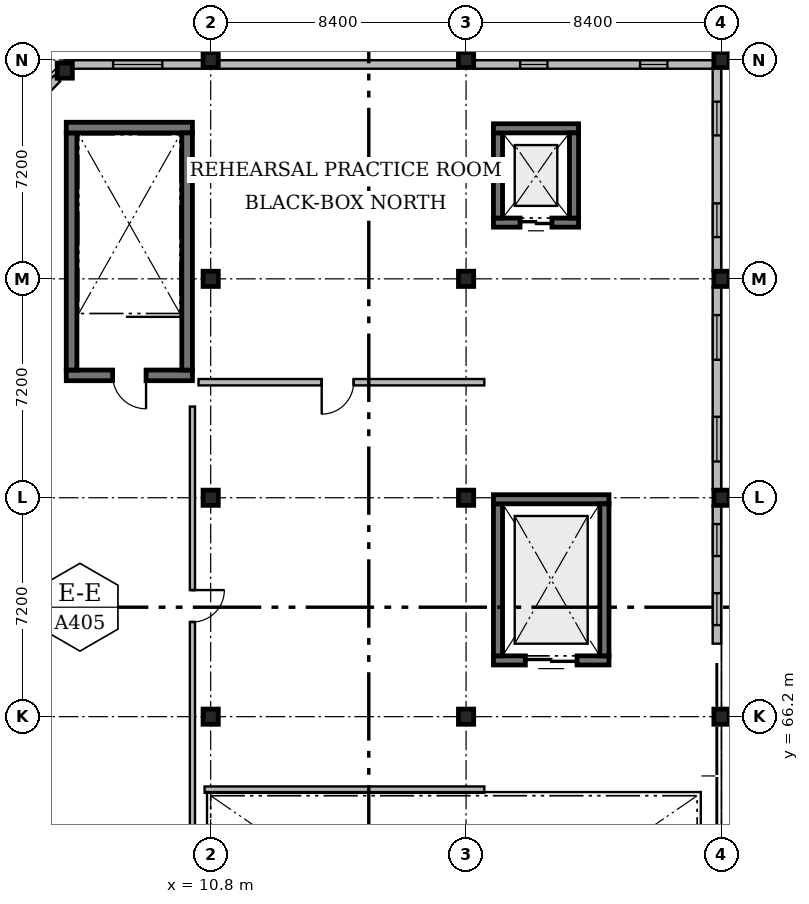
"""IFC4 building model, lengths in metres.
Left out: names, types, materials, properties, quantities, classifications, styles, units other than length and angle.
Written with IfcOpenShell. Run it as: python <this file> out.ifc"""

import sys

from ifc_helpers import new_model, si_unit, direction, frame, frame_2d, origin, origin_2d, place, context, subcontext, project, spatial, rectangle, extrude, element, fill, save


model = new_model("IFC4")
c1 = context("Model", 3, precision=1e-05, world=origin(), true_north=direction((0.0, 1.0)))
c2 = subcontext(c1, "Body", "Model", "MODEL_VIEW")
j1 = project(units=[si_unit("LENGTHUNIT", "METRE"), si_unit("PLANEANGLEUNIT", "RADIAN")], contexts=[c1])
p1 = place(None, origin())
s1 = spatial("IfcSite", under=j1, at=p1, CompositionType="ELEMENT")
p2 = place(p1, origin())
s2 = spatial("IfcBuilding", under=s1, at=p2, CompositionType="ELEMENT")
p3 = place(p2, frame((0.0, 0.0, 13.2)))
s3 = spatial("IfcBuildingStorey", under=s2, at=p3, CompositionType="ELEMENT", Elevation=13.2)
for number, where, z_axis, x_axis in (
    (1, (10.8, 66.2, 0.0), (0.0, 0.0, 1.0), (1.0, 0.0, 0.0)),
    (2, (10.8, 73.4, 0.0), (0.0, 0.0, 1.0), (1.0, 0.0, 0.0)),
    (3, (10.8, 80.6, 0.0), (0.0, 0.0, 1.0), (1.0, 0.0, 0.0)),
    (4, (10.8, 87.8, 0.0), (0.0, 0.0, 1.0), (1.0, 0.0, 0.0)),
    (5, (19.2, 66.2, 0.0), (0.0, 0.0, 1.0), (1.0, 0.0, 0.0)),
    (6, (19.2, 73.4, 0.0), (0.0, 0.0, 1.0), (1.0, 0.0, 0.0)),
    (7, (19.2, 80.6, 0.0), (0.0, 0.0, 1.0), (1.0, 0.0, 0.0)),
    (8, (19.2, 87.8, 0.0), (0.0, 0.0, 1.0), (1.0, 0.0, 0.0)),
    (9, (27.6, 66.2, 0.0), (0.0, 0.0, 1.0), (1.0, 0.0, 0.0)),
    (10, (27.6, 73.4, 0.0), (0.0, 0.0, 1.0), (1.0, 0.0, 0.0)),
    (11, (27.6, 80.6, 0.0), (0.0, 0.0, 1.0), (1.0, 0.0, 0.0)),
    (12, (27.6, 87.8, 0.0), (0.0, 0.0, 1.0), (1.0, 0.0, 0.0)),
):
    element("IfcColumn", number, at=place(p3, frame(where, z_axis=z_axis, x_axis=x_axis)), inside=s3, PredefinedType="COLUMN", context=c2, shape_type="SweptSolid", body=[
        extrude(rectangle(XDim=0.5, YDim=0.5, at=origin_2d()), origin(), (0.0, 0.0, 1.0), 3.71),
    ])
p4 = place(p3, frame((6.0, 87.45, 0.0), z_axis=(0.0, 0.0, 1.0), x_axis=(1.0, 0.0, 0.0)))
e13 = element("IfcColumn", 13, at=p4, inside=s3, PredefinedType="COLUMN", context=c2, shape_type="SweptSolid", body=[
    extrude(rectangle(XDim=0.5, YDim=0.5, at=origin_2d()), origin(), (0.0, 0.0, 1.0), 3.82),
])
p5 = place(p3, frame((10.2, 77.425, 0.0), z_axis=(0.0, 0.0, 1.0), x_axis=(-1.0, 0.0, 0.0)))
e14 = element("IfcWall", 14, at=p5, inside=s3, PredefinedType="SOLIDWALL", context=c2, shape_type="SweptSolid", body=[
    extrude(rectangle(XDim=4.15, YDim=0.35, at=frame_2d((2.075, 0.0))), origin(), (0.0, 0.0, 1.0), 3.6),
])
p6 = place(p5, frame((1.525, 0.0, 0.0)))
e15 = element("IfcOpeningElement", 15, at=p6, cuts=e14, PredefinedType="OPENING", context=c2, shape_type="SweptSolid", body=[
    extrude(rectangle(XDim=1.1, YDim=2.15, at=frame_2d((0.55, 1.075))), frame((0.0, 0.195, 0.0), z_axis=(0.0, -1.0, 0.0), x_axis=(1.0, 0.0, 0.0)), (0.0, 0.0, 1.0), 0.39),
])
p7 = place(p3, frame((6.225, 77.6, 0.0), z_axis=(0.0, 0.0, 1.0), x_axis=(0.0, 1.0, 0.0)))
e16 = element("IfcWall", 16, at=p7, inside=s3, PredefinedType="SOLIDWALL", context=c2, shape_type="SweptSolid", body=[
    extrude(rectangle(XDim=7.8, YDim=0.35, at=frame_2d((3.9, 0.0))), origin(), (0.0, 0.0, 1.0), 3.6),
])
p8 = place(p3, frame((6.05, 85.575, 0.0), z_axis=(0.0, 0.0, 1.0), x_axis=(1.0, 0.0, 0.0)))
e17 = element("IfcWall", 17, at=p8, inside=s3, PredefinedType="SOLIDWALL", context=c2, shape_type="SweptSolid", body=[
    extrude(rectangle(XDim=4.15, YDim=0.35, at=frame_2d((2.075, 0.0))), origin(), (0.0, 0.0, 1.0), 3.6),
])
p9 = place(p3, frame((10.025, 85.4, 0.0), z_axis=(0.0, 0.0, 1.0), x_axis=(0.0, -1.0, 0.0)))
e18 = element("IfcWall", 18, at=p9, inside=s3, PredefinedType="SOLIDWALL", context=c2, shape_type="SweptSolid", body=[
    extrude(rectangle(XDim=7.8, YDim=0.35, at=frame_2d((3.9, 0.0))), origin(), (0.0, 0.0, 1.0), 3.6),
])
p10 = place(p3, frame((22.9, 82.45, 0.0), z_axis=(0.0, 0.0, 1.0), x_axis=(-1.0, 0.0, 0.0)))
e19 = element("IfcWall", 19, at=p10, inside=s3, PredefinedType="SOLIDWALL", context=c2, shape_type="SweptSolid", body=[
    extrude(rectangle(XDim=2.8, YDim=0.3, at=frame_2d((1.4, 0.0))), origin(), (0.0, 0.0, 1.0), 3.6),
])
p11 = place(p10, frame((0.875, 0.0, 0.0)))
e20 = element("IfcOpeningElement", 20, at=p11, cuts=e19, PredefinedType="OPENING", context=c2, shape_type="SweptSolid", body=[
    extrude(rectangle(XDim=1.05, YDim=2.15, at=frame_2d((0.525, 1.075))), frame((0.0, 0.17, 0.0), z_axis=(0.0, -1.0, 0.0), x_axis=(1.0, 0.0, 0.0)), (0.0, 0.0, 1.0), 0.34),
])
for number, where, z_axis, x_axis in (
    (21, (20.25, 82.6, 0.0), (0.0, 0.0, 1.0), (0.0, 1.0, 0.0)),
    (22, (20.1, 85.55, 0.0), (0.0, 0.0, 1.0), (1.0, 0.0, 0.0)),
    (23, (22.75, 85.4, 0.0), (0.0, 0.0, 1.0), (0.0, -1.0, 0.0)),
):
    element("IfcWall", number, at=place(p3, frame(where, z_axis=z_axis, x_axis=x_axis)), inside=s3, PredefinedType="SOLIDWALL", context=c2, shape_type="SweptSolid", body=[
        extrude(rectangle(XDim=2.8, YDim=0.3, at=frame_2d((1.4, 0.0))), origin(), (0.0, 0.0, 1.0), 3.6),
    ])
p12 = place(p3, frame((23.9, 68.05, 0.0), z_axis=(0.0, 0.0, 1.0), x_axis=(-1.0, 0.0, 0.0)))
e24 = element("IfcWall", 24, at=p12, inside=s3, PredefinedType="SOLIDWALL", context=c2, shape_type="SweptSolid", body=[
    extrude(rectangle(XDim=3.8, YDim=0.3, at=frame_2d((1.9, 0.0))), origin(), (0.0, 0.0, 1.0), 3.6),
])
p13 = place(p12, frame((1.05, 0.0, 0.0)))
e25 = element("IfcOpeningElement", 25, at=p13, cuts=e24, PredefinedType="OPENING", context=c2, shape_type="SweptSolid", body=[
    extrude(rectangle(XDim=1.7, YDim=2.4, at=frame_2d((0.85, 1.2))), frame((0.0, 0.17, 0.0), z_axis=(0.0, -1.0, 0.0), x_axis=(1.0, 0.0, 0.0)), (0.0, 0.0, 1.0), 0.34),
])
p14 = place(p3, frame((20.25, 68.2, 0.0), z_axis=(0.0, 0.0, 1.0), x_axis=(0.0, 1.0, 0.0)))
e26 = element("IfcWall", 26, at=p14, inside=s3, PredefinedType="SOLIDWALL", context=c2, shape_type="SweptSolid", body=[
    extrude(rectangle(XDim=5.0, YDim=0.3, at=frame_2d((2.5, 0.0))), origin(), (0.0, 0.0, 1.0), 3.6),
])
p15 = place(p3, frame((20.1, 73.35, 0.0), z_axis=(0.0, 0.0, 1.0), x_axis=(1.0, 0.0, 0.0)))
e27 = element("IfcWall", 27, at=p15, inside=s3, PredefinedType="SOLIDWALL", context=c2, shape_type="SweptSolid", body=[
    extrude(rectangle(XDim=3.8, YDim=0.3, at=frame_2d((1.9, 0.0))), origin(), (0.0, 0.0, 1.0), 3.6),
])
p16 = place(p3, frame((23.75, 73.2, 0.0), z_axis=(0.0, 0.0, 1.0), x_axis=(0.0, -1.0, 0.0)))
e28 = element("IfcWall", 28, at=p16, inside=s3, PredefinedType="SOLIDWALL", context=c2, shape_type="SweptSolid", body=[
    extrude(rectangle(XDim=5.0, YDim=0.3, at=frame_2d((2.5, 0.0))), origin(), (0.0, 0.0, 1.0), 3.6),
])
p17 = place(p3, frame((5.75, 87.193, 0.0), z_axis=(0.0, 0.0, 1.0), x_axis=(-0.696365862768, -0.71768696879, 0.0)))
e29 = element("IfcWall", 29, at=p17, inside=s3, PredefinedType="SOLIDWALL", context=c2, shape_type="SweptSolid", body=[
    extrude(rectangle(XDim=3.95, YDim=0.28, at=frame_2d((1.975, 0.0))), origin(), (0.0, 0.0, 1.0), 3.75),
])
p18 = place(p17, frame((1.2, 0.0, 0.95)))
e30 = element("IfcOpeningElement", 30, at=p18, cuts=e29, PredefinedType="OPENING", context=c2, shape_type="SweptSolid", body=[
    extrude(rectangle(XDim=1.55, YDim=1.8, at=frame_2d((0.775, 0.9))), frame((0.0, 0.16, 0.0), z_axis=(0.0, -1.0, 0.0), x_axis=(1.0, 0.0, 0.0)), (0.0, 0.0, 1.0), 0.32),
])
p19 = place(p3, frame((6.255, 87.65, 0.0), z_axis=(0.0, 0.0, 1.0), x_axis=(1.0, 0.0, 0.0)))
e31 = element("IfcWall", 31, at=p19, inside=s3, PredefinedType="SOLIDWALL", context=c2, shape_type="SweptSolid", body=[
    extrude(rectangle(XDim=4.29, YDim=0.28, at=frame_2d((2.145, 0.0))), origin(), (0.0, 0.0, 1.0), 3.75),
])
p20 = place(p19, frame((1.335, 0.0, 0.95)))
e32 = element("IfcOpeningElement", 32, at=p20, cuts=e31, PredefinedType="OPENING", context=c2, shape_type="SweptSolid", body=[
    extrude(rectangle(XDim=1.62, YDim=1.75, at=frame_2d((0.81, 0.875))), frame((0.0, 0.16, 0.0), z_axis=(0.0, -1.0, 0.0), x_axis=(1.0, 0.0, 0.0)), (0.0, 0.0, 1.0), 0.32),
])
p21 = place(p3, frame((11.055, 87.65, 0.0), z_axis=(0.0, 0.0, 1.0), x_axis=(1.0, 0.0, 0.0)))
e33 = element("IfcWall", 33, at=p21, inside=s3, PredefinedType="SOLIDWALL", context=c2, shape_type="SweptSolid", body=[
    extrude(rectangle(XDim=7.89, YDim=0.28, at=frame_2d((3.945, 0.0))), origin(), (0.0, 0.0, 1.0), 2.993),
])
p22 = place(p3, frame((19.455, 87.65, 0.0), z_axis=(0.0, 0.0, 1.0), x_axis=(1.0, 0.0, 0.0)))
e34 = element("IfcWall", 34, at=p22, inside=s3, PredefinedType="SOLIDWALL", context=c2, shape_type="SweptSolid", body=[
    extrude(rectangle(XDim=7.89, YDim=0.28, at=frame_2d((3.945, 0.0))), origin(), (0.0, 0.0, 1.0), 2.993),
])
p23 = place(p22, frame((1.522, 0.0, 0.95)))
e35 = element("IfcOpeningElement", 35, at=p23, cuts=e34, PredefinedType="OPENING", context=c2, shape_type="SweptSolid", body=[
    extrude(rectangle(XDim=0.9, YDim=1.7, at=frame_2d((0.45, 0.85))), frame((0.0, 0.16, 0.0), z_axis=(0.0, -1.0, 0.0), x_axis=(1.0, 0.0, 0.0)), (0.0, 0.0, 1.0), 0.32),
])
p24 = place(p22, frame((5.468, 0.0, 0.95)))
e36 = element("IfcOpeningElement", 36, at=p24, cuts=e34, PredefinedType="OPENING", context=c2, shape_type="SweptSolid", body=[
    extrude(rectangle(XDim=0.9, YDim=1.7, at=frame_2d((0.45, 0.85))), frame((0.0, 0.16, 0.0), z_axis=(0.0, -1.0, 0.0), x_axis=(1.0, 0.0, 0.0)), (0.0, 0.0, 1.0), 0.32),
])
p25 = place(p3, frame((27.45, 68.6, 0.0), z_axis=(0.0, 0.0, 1.0), x_axis=(0.0, 1.0, 0.0)))
e37 = element("IfcWall", 37, at=p25, inside=s3, PredefinedType="SOLIDWALL", context=c2, shape_type="SweptSolid", body=[
    extrude(rectangle(XDim=4.545, YDim=0.28, at=frame_2d((2.272, 0.0))), origin(), (0.0, 0.0, 1.0), 3.373),
])
p26 = place(p25, frame((0.611, 0.0, 0.95)))
e38 = element("IfcOpeningElement", 38, at=p26, cuts=e37, PredefinedType="OPENING", context=c2, shape_type="SweptSolid", body=[
    extrude(rectangle(XDim=1.05, YDim=1.85, at=frame_2d((0.525, 0.925))), frame((0.0, 0.16, 0.0), z_axis=(0.0, -1.0, 0.0), x_axis=(1.0, 0.0, 0.0)), (0.0, 0.0, 1.0), 0.32),
])
p27 = place(p25, frame((2.884, 0.0, 0.95)))
e39 = element("IfcOpeningElement", 39, at=p27, cuts=e37, PredefinedType="OPENING", context=c2, shape_type="SweptSolid", body=[
    extrude(rectangle(XDim=1.05, YDim=1.85, at=frame_2d((0.525, 0.925))), frame((0.0, 0.16, 0.0), z_axis=(0.0, -1.0, 0.0), x_axis=(1.0, 0.0, 0.0)), (0.0, 0.0, 1.0), 0.32),
])
p28 = place(p3, frame((27.45, 73.655, 0.0), z_axis=(0.0, 0.0, 1.0), x_axis=(0.0, 1.0, 0.0)))
e40 = element("IfcWall", 40, at=p28, inside=s3, PredefinedType="SOLIDWALL", context=c2, shape_type="SweptSolid", body=[
    extrude(rectangle(XDim=6.69, YDim=0.28, at=frame_2d((3.345, 0.0))), origin(), (0.0, 0.0, 1.0), 3.373),
])
p29 = place(p28, frame((0.938, 0.0, 0.95)))
e41 = element("IfcOpeningElement", 41, at=p29, cuts=e40, PredefinedType="OPENING", context=c2, shape_type="SweptSolid", body=[
    extrude(rectangle(XDim=1.47, YDim=1.7, at=frame_2d((0.735, 0.85))), frame((0.0, 0.16, 0.0), z_axis=(0.0, -1.0, 0.0), x_axis=(1.0, 0.0, 0.0)), (0.0, 0.0, 1.0), 0.32),
])
p30 = place(p28, frame((4.282, 0.0, 0.95)))
e42 = element("IfcOpeningElement", 42, at=p30, cuts=e40, PredefinedType="OPENING", context=c2, shape_type="SweptSolid", body=[
    extrude(rectangle(XDim=1.47, YDim=1.7, at=frame_2d((0.735, 0.85))), frame((0.0, 0.16, 0.0), z_axis=(0.0, -1.0, 0.0), x_axis=(1.0, 0.0, 0.0)), (0.0, 0.0, 1.0), 0.32),
])
p31 = place(p3, frame((27.45, 80.855, 0.0), z_axis=(0.0, 0.0, 1.0), x_axis=(0.0, 1.0, 0.0)))
e43 = element("IfcWall", 43, at=p31, inside=s3, PredefinedType="SOLIDWALL", context=c2, shape_type="SweptSolid", body=[
    extrude(rectangle(XDim=6.69, YDim=0.28, at=frame_2d((3.345, 0.0))), origin(), (0.0, 0.0, 1.0), 3.373),
])
p32 = place(p31, frame((1.117, 0.0, 0.95)))
e44 = element("IfcOpeningElement", 44, at=p32, cuts=e43, PredefinedType="OPENING", context=c2, shape_type="SweptSolid", body=[
    extrude(rectangle(XDim=1.11, YDim=1.6, at=frame_2d((0.555, 0.8))), frame((0.0, 0.16, 0.0), z_axis=(0.0, -1.0, 0.0), x_axis=(1.0, 0.0, 0.0)), (0.0, 0.0, 1.0), 0.32),
])
p33 = place(p31, frame((4.462, 0.0, 0.95)))
e45 = element("IfcOpeningElement", 45, at=p33, cuts=e43, PredefinedType="OPENING", context=c2, shape_type="SweptSolid", body=[
    extrude(rectangle(XDim=1.11, YDim=1.6, at=frame_2d((0.555, 0.8))), frame((0.0, 0.16, 0.0), z_axis=(0.0, -1.0, 0.0), x_axis=(1.0, 0.0, 0.0)), (0.0, 0.0, 1.0), 0.32),
])
p34 = place(p3, frame((10.6, 63.8, 0.0), z_axis=(0.0, 0.0, 1.0), x_axis=(1.0, 0.0, 0.0)))
e46 = element("IfcWall", 46, at=p34, inside=s3, PredefinedType="PARTITIONING", context=c2, shape_type="SweptSolid", body=[
    extrude(rectangle(XDim=9.2, YDim=0.21, at=frame_2d((4.6, 0.0))), origin(), (0.0, 0.0, 1.0), 3.66),
])
p35 = place(p3, frame((10.2, 76.4, 0.0), z_axis=(0.0, 0.0, 1.0), x_axis=(0.0, -1.0, 0.0)))
e47 = element("IfcWall", 47, at=p35, inside=s3, PredefinedType="PARTITIONING", context=c2, shape_type="SweptSolid", body=[
    extrude(rectangle(XDim=24.0, YDim=0.17, at=frame_2d((12.0, 0.0))), origin(), (0.0, 0.0, 1.0), 3.66),
])
p36 = place(p35, frame((6.036, 0.0, 0.0)))
e48 = element("IfcOpeningElement", 48, at=p36, cuts=e47, PredefinedType="OPENING", context=c2, shape_type="SweptSolid", body=[
    extrude(rectangle(XDim=1.05, YDim=2.15, at=frame_2d((0.525, 1.075))), frame((0.0, 0.105, 0.0), z_axis=(0.0, -1.0, 0.0), x_axis=(1.0, 0.0, 0.0)), (0.0, 0.0, 1.0), 0.21),
])
p37 = place(p3, frame((19.8, 77.2, 0.0), z_axis=(0.0, 0.0, 1.0), x_axis=(-1.0, 0.0, 0.0)))
e49 = element("IfcWall", 49, at=p37, inside=s3, PredefinedType="PARTITIONING", context=c2, shape_type="SweptSolid", body=[
    extrude(rectangle(XDim=9.4, YDim=0.21, at=frame_2d((4.7, 0.0))), origin(), (0.0, 0.0, 1.0), 3.66),
])
p38 = place(p37, frame((4.298, 0.0, 0.0)))
e50 = element("IfcOpeningElement", 50, at=p38, cuts=e49, PredefinedType="OPENING", context=c2, shape_type="SweptSolid", body=[
    extrude(rectangle(XDim=1.05, YDim=2.25, at=frame_2d((0.525, 1.125))), frame((0.0, 0.125, 0.0), z_axis=(0.0, -1.0, 0.0), x_axis=(1.0, 0.0, 0.0)), (0.0, 0.0, 1.0), 0.25),
])
p39 = place(p6, origin())
e51 = element("IfcDoor", 51, at=p39, inside=s3, OperationType="SINGLE_SWING_LEFT", PredefinedType="DOOR", context=c2, shape_type="SweptSolid", body=[
    extrude(rectangle(XDim=1.1, YDim=2.15, at=frame_2d((0.55, 1.075))), frame((0.0, 0.025, 0.0), z_axis=(0.0, -1.0, 0.0), x_axis=(1.0, 0.0, 0.0)), (0.0, 0.0, 1.0), 0.05),
])
fill(e15, e51)
p40 = place(p11, origin())
e52 = element("IfcDoor", 52, at=p40, inside=s3, OperationType="DOUBLE_DOOR_SLIDING", PredefinedType="DOOR", context=c2, shape_type="SweptSolid", body=[
    extrude(rectangle(XDim=1.05, YDim=2.15, at=frame_2d((0.525, 1.075))), frame((0.0, 0.025, 0.0), z_axis=(0.0, -1.0, 0.0), x_axis=(1.0, 0.0, 0.0)), (0.0, 0.0, 1.0), 0.05),
])
fill(e20, e52)
p41 = place(p13, origin())
e53 = element("IfcDoor", 53, at=p41, inside=s3, OperationType="DOUBLE_DOOR_SLIDING", PredefinedType="DOOR", context=c2, shape_type="SweptSolid", body=[
    extrude(rectangle(XDim=1.7, YDim=2.4, at=frame_2d((0.85, 1.2))), frame((0.0, 0.025, 0.0), z_axis=(0.0, -1.0, 0.0), x_axis=(1.0, 0.0, 0.0)), (0.0, 0.0, 1.0), 0.05),
])
fill(e25, e53)
p42 = place(p20, origin())
e54 = element("IfcWindow", 54, at=p42, inside=s3, PartitioningType="SINGLE_PANEL", PredefinedType="WINDOW", context=c2, shape_type="SweptSolid", body=[
    extrude(rectangle(XDim=1.62, YDim=1.75, at=frame_2d((0.81, 0.875))), frame((0.0, 0.03, 0.0), z_axis=(0.0, -1.0, 0.0), x_axis=(1.0, 0.0, 0.0)), (0.0, 0.0, 1.0), 0.06),
])
fill(e32, e54)
p43 = place(p23, origin())
e55 = element("IfcWindow", 55, at=p43, inside=s3, PartitioningType="SINGLE_PANEL", PredefinedType="WINDOW", context=c2, shape_type="SweptSolid", body=[
    extrude(rectangle(XDim=0.9, YDim=1.7, at=frame_2d((0.45, 0.85))), frame((0.0, 0.03, 0.0), z_axis=(0.0, -1.0, 0.0), x_axis=(1.0, 0.0, 0.0)), (0.0, 0.0, 1.0), 0.06),
])
fill(e35, e55)
p44 = place(p24, origin())
e56 = element("IfcWindow", 56, at=p44, inside=s3, PartitioningType="SINGLE_PANEL", PredefinedType="WINDOW", context=c2, shape_type="SweptSolid", body=[
    extrude(rectangle(XDim=0.9, YDim=1.7, at=frame_2d((0.45, 0.85))), frame((0.0, 0.03, 0.0), z_axis=(0.0, -1.0, 0.0), x_axis=(1.0, 0.0, 0.0)), (0.0, 0.0, 1.0), 0.06),
])
fill(e36, e56)
p45 = place(p26, origin())
e57 = element("IfcWindow", 57, at=p45, inside=s3, PartitioningType="SINGLE_PANEL", PredefinedType="WINDOW", context=c2, shape_type="SweptSolid", body=[
    extrude(rectangle(XDim=1.05, YDim=1.85, at=frame_2d((0.525, 0.925))), frame((0.0, 0.03, 0.0), z_axis=(0.0, -1.0, 0.0), x_axis=(1.0, 0.0, 0.0)), (0.0, 0.0, 1.0), 0.06),
])
fill(e38, e57)
p46 = place(p27, origin())
e58 = element("IfcWindow", 58, at=p46, inside=s3, PartitioningType="SINGLE_PANEL", PredefinedType="WINDOW", context=c2, shape_type="SweptSolid", body=[
    extrude(rectangle(XDim=1.05, YDim=1.85, at=frame_2d((0.525, 0.925))), frame((0.0, 0.03, 0.0), z_axis=(0.0, -1.0, 0.0), x_axis=(1.0, 0.0, 0.0)), (0.0, 0.0, 1.0), 0.06),
])
fill(e39, e58)
p47 = place(p29, origin())
e59 = element("IfcWindow", 59, at=p47, inside=s3, PartitioningType="SINGLE_PANEL", PredefinedType="WINDOW", context=c2, shape_type="SweptSolid", body=[
    extrude(rectangle(XDim=1.47, YDim=1.7, at=frame_2d((0.735, 0.85))), frame((0.0, 0.03, 0.0), z_axis=(0.0, -1.0, 0.0), x_axis=(1.0, 0.0, 0.0)), (0.0, 0.0, 1.0), 0.06),
])
fill(e41, e59)
p48 = place(p30, origin())
e60 = element("IfcWindow", 60, at=p48, inside=s3, PartitioningType="SINGLE_PANEL", PredefinedType="WINDOW", context=c2, shape_type="SweptSolid", body=[
    extrude(rectangle(XDim=1.47, YDim=1.7, at=frame_2d((0.735, 0.85))), frame((0.0, 0.03, 0.0), z_axis=(0.0, -1.0, 0.0), x_axis=(1.0, 0.0, 0.0)), (0.0, 0.0, 1.0), 0.06),
])
fill(e42, e60)
p49 = place(p32, origin())
e61 = element("IfcWindow", 61, at=p49, inside=s3, PartitioningType="SINGLE_PANEL", PredefinedType="WINDOW", context=c2, shape_type="SweptSolid", body=[
    extrude(rectangle(XDim=1.11, YDim=1.6, at=frame_2d((0.555, 0.8))), frame((0.0, 0.03, 0.0), z_axis=(0.0, -1.0, 0.0), x_axis=(1.0, 0.0, 0.0)), (0.0, 0.0, 1.0), 0.06),
])
fill(e44, e61)
p50 = place(p33, origin())
e62 = element("IfcWindow", 62, at=p50, inside=s3, PartitioningType="SINGLE_PANEL", PredefinedType="WINDOW", context=c2, shape_type="SweptSolid", body=[
    extrude(rectangle(XDim=1.11, YDim=1.6, at=frame_2d((0.555, 0.8))), frame((0.0, 0.03, 0.0), z_axis=(0.0, -1.0, 0.0), x_axis=(1.0, 0.0, 0.0)), (0.0, 0.0, 1.0), 0.06),
])
fill(e45, e62)
p51 = place(p36, origin())
e63 = element("IfcDoor", 63, at=p51, inside=s3, OperationType="SINGLE_SWING_LEFT", PredefinedType="DOOR", context=c2, shape_type="SweptSolid", body=[
    extrude(rectangle(XDim=1.05, YDim=2.15, at=frame_2d((0.525, 1.075))), frame((0.0, 0.025, 0.0), z_axis=(0.0, -1.0, 0.0), x_axis=(1.0, 0.0, 0.0)), (0.0, 0.0, 1.0), 0.05),
])
fill(e48, e63)
p52 = place(p38, origin())
e64 = element("IfcDoor", 64, at=p52, inside=s3, OperationType="SINGLE_SWING_RIGHT", PredefinedType="DOOR", context=c2, shape_type="SweptSolid", body=[
    extrude(rectangle(XDim=1.05, YDim=2.25, at=frame_2d((0.525, 1.125))), frame((0.0, 0.025, 0.0), z_axis=(0.0, -1.0, 0.0), x_axis=(1.0, 0.0, 0.0)), (0.0, 0.0, 1.0), 0.05),
])
fill(e50, e64)
save(model, sys.argv[1])
